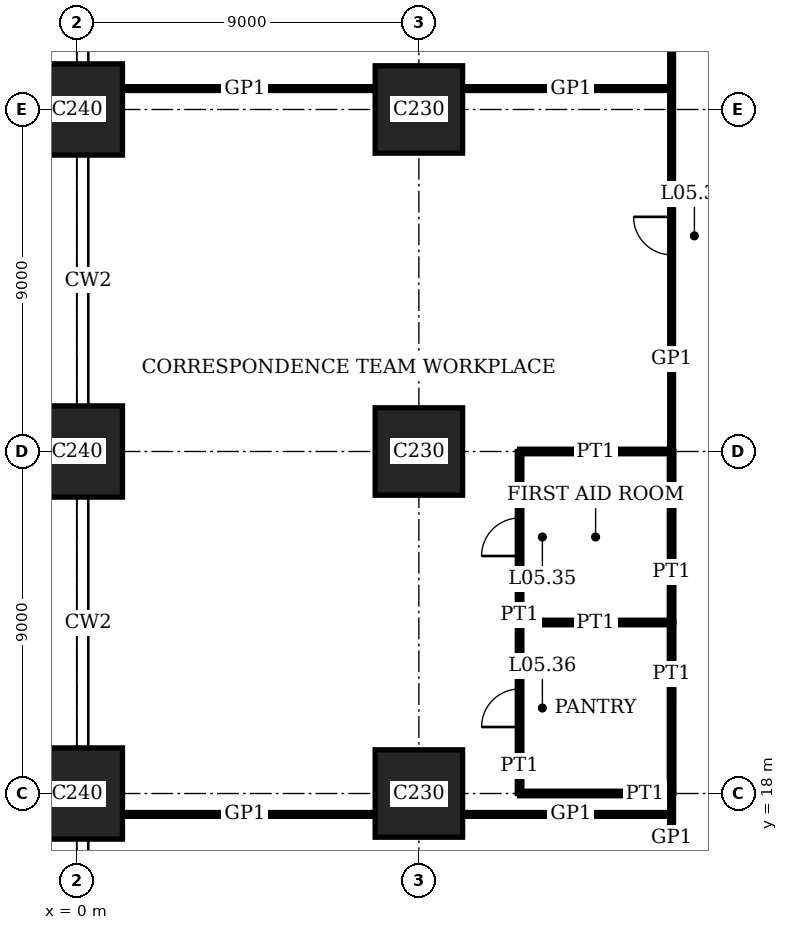
"""IFC4 building model, lengths in metres.
Left out: names, types, materials, properties, quantities, classifications, styles, units other than length and angle.
Written with IfcOpenShell. Run it as: python <this file> out.ifc"""

import sys

from ifc_helpers import new_model, si_unit, direction, frame, frame_2d, origin, origin_2d, place, context, subcontext, project, spatial, rectangle, extrude, element, fill, save


model = new_model("IFC4")
c1 = context("Model", 3, precision=1e-05, world=origin(), true_north=direction((0.0, 1.0)))
c2 = subcontext(c1, "Body", "Model", "MODEL_VIEW")
j1 = project(units=[si_unit("LENGTHUNIT", "METRE"), si_unit("PLANEANGLEUNIT", "RADIAN")], contexts=[c1])
p1 = place(None, origin())
s1 = spatial("IfcSite", under=j1, at=p1, CompositionType="ELEMENT")
p2 = place(p1, origin())
s2 = spatial("IfcBuilding", under=s1, at=p2, CompositionType="ELEMENT")
p3 = place(p2, frame((0.0, 0.0, 23.8)))
s3 = spatial("IfcBuildingStorey", under=s2, at=p3, CompositionType="ELEMENT", Elevation=23.8)
for number, where, z_axis, x_axis in (
    (1, (0.0, 18.0, 0.0), (0.0, 0.0, 1.0), (1.0, 0.0, 0.0)),
    (2, (0.0, 27.0, 0.0), (0.0, 0.0, 1.0), (1.0, 0.0, 0.0)),
    (3, (0.0, 36.0, 0.0), (0.0, 0.0, 1.0), (1.0, 0.0, 0.0)),
):
    element("IfcColumn", number, at=place(p3, frame(where, z_axis=z_axis, x_axis=x_axis)), inside=s3, PredefinedType="COLUMN", context=c2, shape_type="SweptSolid", body=[
        extrude(rectangle(XDim=2.4, YDim=2.4, at=origin_2d()), origin(), (0.0, 0.0, 1.0), 4.0),
    ])
for number, where, z_axis, x_axis in (
    (4, (9.0, 18.0, 0.0), (0.0, 0.0, 1.0), (1.0, 0.0, 0.0)),
    (5, (9.0, 27.0, 0.0), (0.0, 0.0, 1.0), (1.0, 0.0, 0.0)),
    (6, (9.0, 36.0, 0.0), (0.0, 0.0, 1.0), (1.0, 0.0, 0.0)),
):
    element("IfcColumn", number, at=place(p3, frame(where, z_axis=z_axis, x_axis=x_axis)), inside=s3, PredefinedType="COLUMN", context=c2, shape_type="SweptSolid", body=[
        extrude(rectangle(XDim=2.3, YDim=2.3, at=origin_2d()), origin(), (0.0, 0.0, 1.0), 4.0),
    ])
p4 = place(p3, frame((1.2, 17.45, 0.0), z_axis=(0.0, 0.0, 1.0), x_axis=(1.0, 0.0, 0.0)))
e7 = element("IfcWall", 7, at=p4, inside=s3, PredefinedType="PARTITIONING", context=c2, shape_type="SweptSolid", body=[
    extrude(rectangle(XDim=6.65, YDim=0.1, at=frame_2d((3.325, 0.0))), origin(), (0.0, 0.0, 1.0), 3.75),
])
p5 = place(p3, frame((10.15, 17.45, 0.0), z_axis=(0.0, 0.0, 1.0), x_axis=(1.0, 0.0, 0.0)))
e8 = element("IfcWall", 8, at=p5, inside=s3, PredefinedType="PARTITIONING", context=c2, shape_type="SweptSolid", body=[
    extrude(rectangle(XDim=5.5, YDim=0.1, at=frame_2d((2.75, 0.0))), origin(), (0.0, 0.0, 1.0), 3.75),
])
p6 = place(p3, frame((11.65, 18.0, 0.0), z_axis=(0.0, 0.0, 1.0), x_axis=(1.0, 0.0, 0.0)))
e9 = element("IfcWall", 9, at=p6, inside=s3, PredefinedType="PARTITIONING", context=c2, shape_type="SweptSolid", body=[
    extrude(rectangle(XDim=4.0, YDim=0.12, at=frame_2d((2.0, 0.0))), origin(), (0.0, 0.0, 1.0), 3.05),
])
p7 = place(p3, frame((11.65, 22.5, 0.0), z_axis=(0.0, 0.0, 1.0), x_axis=(1.0, 0.0, 0.0)))
e10 = element("IfcWall", 10, at=p7, inside=s3, PredefinedType="PARTITIONING", context=c2, shape_type="SweptSolid", body=[
    extrude(rectangle(XDim=4.0, YDim=0.12, at=frame_2d((2.0, 0.0))), origin(), (0.0, 0.0, 1.0), 3.1),
])
p8 = place(p3, frame((11.65, 27.0, 0.0), z_axis=(0.0, 0.0, 1.0), x_axis=(1.0, 0.0, 0.0)))
e11 = element("IfcWall", 11, at=p8, inside=s3, PredefinedType="PARTITIONING", context=c2, shape_type="SweptSolid", body=[
    extrude(rectangle(XDim=4.0, YDim=0.12, at=frame_2d((2.0, 0.0))), origin(), (0.0, 0.0, 1.0), 3.05),
])
p9 = place(p3, frame((1.2, 36.55, 0.0), z_axis=(0.0, 0.0, 1.0), x_axis=(1.0, 0.0, 0.0)))
e12 = element("IfcWall", 12, at=p9, inside=s3, PredefinedType="PARTITIONING", context=c2, shape_type="SweptSolid", body=[
    extrude(rectangle(XDim=6.65, YDim=0.1, at=frame_2d((3.325, 0.0))), origin(), (0.0, 0.0, 1.0), 3.75),
])
p10 = place(p3, frame((10.15, 36.55, 0.0), z_axis=(0.0, 0.0, 1.0), x_axis=(1.0, 0.0, 0.0)))
e13 = element("IfcWall", 13, at=p10, inside=s3, PredefinedType="PARTITIONING", context=c2, shape_type="SweptSolid", body=[
    extrude(rectangle(XDim=5.5, YDim=0.1, at=frame_2d((2.75, 0.0))), origin(), (0.0, 0.0, 1.0), 3.75),
])
p11 = place(p3, frame((11.65, 22.5, 0.0), z_axis=(0.0, 0.0, 1.0), x_axis=(0.0, 1.0, 0.0)))
e14 = element("IfcWall", 14, at=p11, inside=s3, PredefinedType="PARTITIONING", context=c2, shape_type="SweptSolid", body=[
    extrude(rectangle(XDim=4.5, YDim=0.12, at=frame_2d((2.25, 0.0))), origin(), (0.0, 0.0, 1.0), 3.75),
])
p12 = place(p11, frame((1.75, 0.0, 0.0)))
e15 = element("IfcOpeningElement", 15, at=p12, cuts=e14, PredefinedType="OPENING", context=c2, shape_type="SweptSolid", body=[
    extrude(rectangle(XDim=1.0, YDim=2.4, at=frame_2d((0.5, 1.2))), frame((0.0, 0.07, 0.0), z_axis=(0.0, -1.0, 0.0), x_axis=(1.0, 0.0, 0.0)), (0.0, 0.0, 1.0), 0.14),
])
p13 = place(p3, frame((11.65, 18.0, 0.0), z_axis=(0.0, 0.0, 1.0), x_axis=(0.0, 1.0, 0.0)))
e16 = element("IfcWall", 16, at=p13, inside=s3, PredefinedType="PARTITIONING", context=c2, shape_type="SweptSolid", body=[
    extrude(rectangle(XDim=4.5, YDim=0.12, at=frame_2d((2.25, 0.0))), origin(), (0.0, 0.0, 1.0), 3.75),
])
p14 = place(p13, frame((1.75, 0.0, 0.0)))
e17 = element("IfcOpeningElement", 17, at=p14, cuts=e16, PredefinedType="OPENING", context=c2, shape_type="SweptSolid", body=[
    extrude(rectangle(XDim=1.0, YDim=2.4, at=frame_2d((0.5, 1.2))), frame((0.0, 0.07, 0.0), z_axis=(0.0, -1.0, 0.0), x_axis=(1.0, 0.0, 0.0)), (0.0, 0.0, 1.0), 0.14),
])
for number, where, z_axis, x_axis in (
    (18, (15.65, 22.5, 0.0), (0.0, 0.0, 1.0), (0.0, 1.0, 0.0)),
    (19, (15.65, 18.0, 0.0), (0.0, 0.0, 1.0), (0.0, 1.0, 0.0)),
):
    element("IfcWall", number, at=place(p3, frame(where, z_axis=z_axis, x_axis=x_axis)), inside=s3, PredefinedType="PARTITIONING", context=c2, shape_type="SweptSolid", body=[
        extrude(rectangle(XDim=4.5, YDim=0.12, at=frame_2d((2.25, 0.0))), origin(), (0.0, 0.0, 1.0), 3.75),
    ])
p15 = place(p3, frame((15.65, 15.65, 0.0), z_axis=(0.0, 0.0, 1.0), x_axis=(0.0, 1.0, 0.0)))
e20 = element("IfcWall", 20, at=p15, inside=s3, PredefinedType="PARTITIONING", context=c2, shape_type="SweptSolid", body=[
    extrude(rectangle(XDim=2.35, YDim=0.1, at=frame_2d((1.175, 0.0))), origin(), (0.0, 0.0, 1.0), 3.75),
])
p16 = place(p3, frame((15.65, 27.0, 0.0), z_axis=(0.0, 0.0, 1.0), x_axis=(0.0, 1.0, 0.0)))
e21 = element("IfcWall", 21, at=p16, inside=s3, PredefinedType="PARTITIONING", context=c2, shape_type="SweptSolid", body=[
    extrude(rectangle(XDim=11.35, YDim=0.1, at=frame_2d((5.675, 0.0))), origin(), (0.0, 0.0, 1.0), 3.75),
])
p17 = place(p16, frame((5.175, 0.0, 0.0)))
e22 = element("IfcOpeningElement", 22, at=p17, cuts=e21, PredefinedType="OPENING", context=c2, shape_type="SweptSolid", body=[
    extrude(rectangle(XDim=1.0, YDim=2.4, at=frame_2d((0.5, 1.2))), frame((0.0, 0.06, 0.0), z_axis=(0.0, -1.0, 0.0), x_axis=(1.0, 0.0, 0.0)), (0.0, 0.0, 1.0), 0.12),
])
p18 = place(p12, origin())
e23 = element("IfcDoor", 23, at=p18, inside=s3, OperationType="SINGLE_SWING_RIGHT", PredefinedType="DOOR", context=c2, shape_type="SweptSolid", body=[
    extrude(rectangle(XDim=1.0, YDim=2.4, at=frame_2d((0.5, 1.2))), frame((0.0, 0.025, 0.0), z_axis=(0.0, -1.0, 0.0), x_axis=(1.0, 0.0, 0.0)), (0.0, 0.0, 1.0), 0.05),
])
fill(e15, e23)
p19 = place(p14, origin())
e24 = element("IfcDoor", 24, at=p19, inside=s3, OperationType="SINGLE_SWING_RIGHT", PredefinedType="DOOR", context=c2, shape_type="SweptSolid", body=[
    extrude(rectangle(XDim=1.0, YDim=2.4, at=frame_2d((0.5, 1.2))), frame((0.0, 0.025, 0.0), z_axis=(0.0, -1.0, 0.0), x_axis=(1.0, 0.0, 0.0)), (0.0, 0.0, 1.0), 0.05),
])
fill(e17, e24)
p20 = place(p17, origin())
e25 = element("IfcDoor", 25, at=p20, inside=s3, OperationType="SINGLE_SWING_LEFT", PredefinedType="DOOR", context=c2, shape_type="SweptSolid", body=[
    extrude(rectangle(XDim=1.0, YDim=2.4, at=frame_2d((0.5, 1.2))), frame((0.0, 0.02, 0.0), z_axis=(0.0, -1.0, 0.0), x_axis=(1.0, 0.0, 0.0)), (0.0, 0.0, 1.0), 0.04),
])
fill(e22, e25)
save(model, sys.argv[1])
